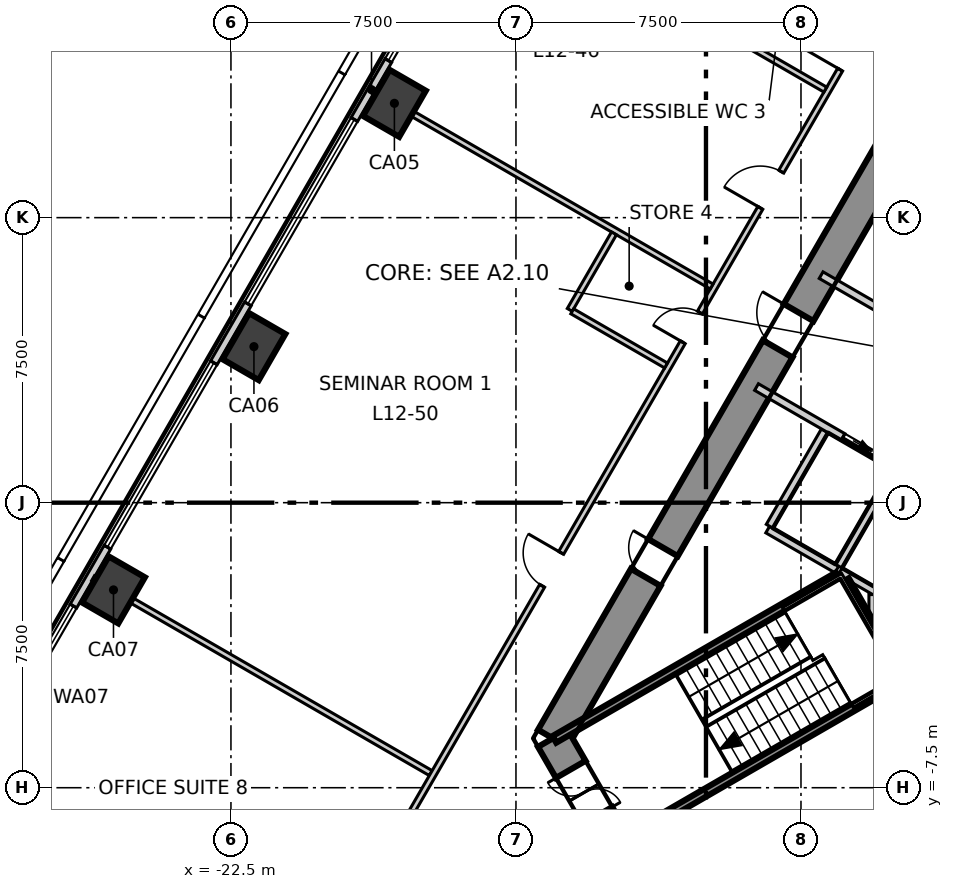
"""IFC4 building model, lengths in metres.
Left out: names, types, materials, properties, quantities, classifications, styles, units other than length and angle.
Written with IfcOpenShell. Run it as: python <this file> out.ifc"""

import sys

from ifc_helpers import new_model, si_unit, direction, frame, frame_2d, origin, origin_2d, place, context, subcontext, project, spatial, polyline, rectangle, outline, extrude, element, fill, save


model = new_model("IFC4")
c1 = context("Model", 3, precision=1e-05, world=origin(), true_north=direction((0.0, 1.0)))
c2 = subcontext(c1, "Body", "Model", "MODEL_VIEW")
j1 = project(units=[si_unit("LENGTHUNIT", "METRE"), si_unit("PLANEANGLEUNIT", "RADIAN")], contexts=[c1])
p1 = place(None, origin())
s1 = spatial("IfcSite", under=j1, at=p1, CompositionType="ELEMENT")
p2 = place(p1, origin())
s2 = spatial("IfcBuilding", under=s1, at=p2, CompositionType="ELEMENT")
p3 = place(p2, frame((0.0, 0.0, 59.3)))
s3 = spatial("IfcBuildingStorey", under=s2, at=p3, CompositionType="ELEMENT", Elevation=59.3)
p4 = place(p3, frame((-1.645, 15.25, -0.3), z_axis=(0.0, 0.0, 1.0), x_axis=(-0.500026485275, -0.866010111964, 0.0)))
e1 = element("IfcWall", 1, at=p4, inside=s3, PredefinedType="SHEAR", context=c2, shape_type="SweptSolid", body=[
    extrude(outline(polyline([(-0.26, -0.45), (1.685, -0.45), (3.63, -0.45), (5.576, -0.45), (7.521, -0.45), (9.466, -0.449), (11.411, -0.449), (13.357, -0.449), (15.302, -0.449), (17.247, -0.449), (19.192, -0.449), (21.138, -0.449), (23.083, -0.449), (25.028, -0.449), (24.509, 0.45), (22.644, 0.45), (20.778, 0.45), (18.913, 0.45), (17.048, 0.45), (15.182, 0.449), (13.317, 0.449), (11.452, 0.449), (9.587, 0.449), (7.721, 0.449), (5.856, 0.449), (3.991, 0.449), (2.125, 0.449), (0.26, 0.449), (-0.26, -0.45)])), origin(), (0.0, 0.0, 1.0), 4.0),
])
p5 = place(p4, frame((11.834, 0.0, 0.3)))
e2 = element("IfcOpeningElement", 2, at=p5, cuts=e1, PredefinedType="OPENING", context=c2, shape_type="SweptSolid", body=[
    extrude(rectangle(XDim=1.1, YDim=2.1, at=frame_2d((0.55, 1.05))), frame((0.0, 0.46, 0.0), z_axis=(0.0, -1.0, 0.0), x_axis=(1.0, 0.0, 0.0)), (0.0, 0.0, 1.0), 0.92),
])
p6 = place(p4, frame((18.976, 0.0, 0.3)))
e3 = element("IfcOpeningElement", 3, at=p6, cuts=e1, PredefinedType="OPENING", context=c2, shape_type="SweptSolid", body=[
    extrude(rectangle(XDim=0.9, YDim=2.1, at=frame_2d((0.45, 1.05))), frame((0.0, 0.46, 0.0), z_axis=(0.0, -1.0, 0.0), x_axis=(1.0, 0.0, 0.0)), (0.0, 0.0, 1.0), 0.92),
])
p7 = place(p4, frame((4.892, 0.0, 0.3)))
e4 = element("IfcOpeningElement", 4, at=p7, cuts=e1, PredefinedType="OPENING", context=c2, shape_type="SweptSolid", body=[
    extrude(rectangle(XDim=0.9, YDim=2.1, at=frame_2d((0.45, 1.05))), frame((0.0, 0.46, 0.0), z_axis=(0.0, -1.0, 0.0), x_axis=(1.0, 0.0, 0.0)), (0.0, 0.0, 1.0), 0.92),
])
p8 = place(p3, frame((-14.03, -6.2, -0.3), z_axis=(0.0, 0.0, 1.0), x_axis=(0.500111984565, -0.865960739811, 0.0)))
e5 = element("IfcWall", 5, at=p8, inside=s3, PredefinedType="SHEAR", context=c2, shape_type="SweptSolid", body=[
    extrude(outline(polyline([(-0.26, -0.449), (1.646, -0.449), (3.551, -0.45), (3.032, 0.45), (1.646, 0.45), (0.26, 0.45), (-0.26, -0.449)])), origin(), (0.0, 0.0, 1.0), 4.0),
])
p9 = place(p8, frame((0.946, 0.0, 0.3)))
e6 = element("IfcOpeningElement", 6, at=p9, cuts=e5, PredefinedType="OPENING", context=c2, shape_type="SweptSolid", body=[
    extrude(rectangle(XDim=1.4, YDim=2.1, at=frame_2d((0.7, 1.05))), frame((0.0, 0.46, 0.0), z_axis=(0.0, -1.0, 0.0), x_axis=(1.0, 0.0, 0.0)), (0.0, 0.0, 1.0), 0.92),
])
for number, where, z_axis, x_axis in (
    (7, (-18.199, 10.508, -0.3), (0.0, 0.0, 1.0), (0.5, 0.866, 0.0)),
    (8, (-21.895, 4.106, -0.3), (0.0, 0.0, 1.0), (0.5, 0.866, 0.0)),
    (9, (-25.591, -2.295, -0.3), (0.0, 0.0, 1.0), (0.5, 0.866, 0.0)),
):
    element("IfcColumn", number, at=place(p3, frame(where, z_axis=z_axis, x_axis=x_axis)), inside=s3, PredefinedType="COLUMN", context=c2, shape_type="SweptSolid", body=[
        extrude(rectangle(XDim=1.4, YDim=1.1, at=origin_2d()), origin(), (0.0, 0.0, 1.0), 4.0),
    ])
p10 = place(p3, frame((-3.371, 37.591, 0.0), z_axis=(0.0, 0.0, 1.0), x_axis=(-0.500006313899, -0.866021758423, 0.0)))
e10 = element("IfcWall", 10, at=p10, inside=s3, PredefinedType="ELEMENTEDWALL", context=c2, shape_type="SweptSolid", body=[
    extrude(rectangle(XDim=61.719, YDim=0.2, at=frame_2d((30.859, 0.0))), origin(), (0.0, 0.0, 1.0), 3.7),
])
p11 = place(p10, frame((2.198, 0.0, 0.9)))
e11 = element("IfcOpeningElement", 11, at=p11, cuts=e10, PredefinedType="OPENING", context=c2, shape_type="SweptSolid", body=[
    extrude(rectangle(XDim=5.6, YDim=2.5, at=frame_2d((2.8, 1.25))), frame((0.0, 0.11, 0.0), z_axis=(0.0, -1.0, 0.0), x_axis=(1.0, 0.0, 0.0)), (0.0, 0.0, 1.0), 0.22),
])
p12 = place(p10, frame((9.59, 0.0, 0.9)))
e12 = element("IfcOpeningElement", 12, at=p12, cuts=e10, PredefinedType="OPENING", context=c2, shape_type="SweptSolid", body=[
    extrude(rectangle(XDim=5.6, YDim=2.5, at=frame_2d((2.8, 1.25))), frame((0.0, 0.11, 0.0), z_axis=(0.0, -1.0, 0.0), x_axis=(1.0, 0.0, 0.0)), (0.0, 0.0, 1.0), 0.22),
])
p13 = place(p10, frame((16.982, 0.0, 0.9)))
e13 = element("IfcOpeningElement", 13, at=p13, cuts=e10, PredefinedType="OPENING", context=c2, shape_type="SweptSolid", body=[
    extrude(rectangle(XDim=5.6, YDim=2.5, at=frame_2d((2.8, 1.25))), frame((0.0, 0.11, 0.0), z_axis=(0.0, -1.0, 0.0), x_axis=(1.0, 0.0, 0.0)), (0.0, 0.0, 1.0), 0.22),
])
p14 = place(p10, frame((24.373, 0.0, 0.9)))
e14 = element("IfcOpeningElement", 14, at=p14, cuts=e10, PredefinedType="OPENING", context=c2, shape_type="SweptSolid", body=[
    extrude(rectangle(XDim=5.6, YDim=2.5, at=frame_2d((2.8, 1.25))), frame((0.0, 0.11, 0.0), z_axis=(0.0, -1.0, 0.0), x_axis=(1.0, 0.0, 0.0)), (0.0, 0.0, 1.0), 0.22),
])
p15 = place(p10, frame((31.765, 0.0, 0.9)))
e15 = element("IfcOpeningElement", 15, at=p15, cuts=e10, PredefinedType="OPENING", context=c2, shape_type="SweptSolid", body=[
    extrude(rectangle(XDim=5.6, YDim=2.5, at=frame_2d((2.8, 1.25))), frame((0.0, 0.11, 0.0), z_axis=(0.0, -1.0, 0.0), x_axis=(1.0, 0.0, 0.0)), (0.0, 0.0, 1.0), 0.22),
])
p16 = place(p10, frame((39.157, 0.0, 0.9)))
e16 = element("IfcOpeningElement", 16, at=p16, cuts=e10, PredefinedType="OPENING", context=c2, shape_type="SweptSolid", body=[
    extrude(rectangle(XDim=5.6, YDim=2.5, at=frame_2d((2.8, 1.25))), frame((0.0, 0.11, 0.0), z_axis=(0.0, -1.0, 0.0), x_axis=(1.0, 0.0, 0.0)), (0.0, 0.0, 1.0), 0.22),
])
p17 = place(p10, frame((46.548, 0.0, 0.9)))
e17 = element("IfcOpeningElement", 17, at=p17, cuts=e10, PredefinedType="OPENING", context=c2, shape_type="SweptSolid", body=[
    extrude(rectangle(XDim=5.6, YDim=2.5, at=frame_2d((2.8, 1.25))), frame((0.0, 0.11, 0.0), z_axis=(0.0, -1.0, 0.0), x_axis=(1.0, 0.0, 0.0)), (0.0, 0.0, 1.0), 0.22),
])
p18 = place(p10, frame((53.94, 0.0, 0.9)))
e18 = element("IfcOpeningElement", 18, at=p18, cuts=e10, PredefinedType="OPENING", context=c2, shape_type="SweptSolid", body=[
    extrude(rectangle(XDim=5.6, YDim=2.5, at=frame_2d((2.8, 1.25))), frame((0.0, 0.11, 0.0), z_axis=(0.0, -1.0, 0.0), x_axis=(1.0, 0.0, 0.0)), (0.0, 0.0, 1.0), 0.22),
])
p19 = place(p3, frame((-26.128, -1.985, 0.0), z_axis=(0.0, 0.0, 1.0), x_axis=(0.866020337685, -0.500008774639, 0.0)))
e19 = element("IfcWall", 19, at=p19, inside=s3, PredefinedType="PARTITIONING", context=c2, shape_type="SweptSolid", body=[
    extrude(rectangle(XDim=10.26, YDim=0.15, at=frame_2d((5.13, 0.0))), origin(), (0.0, 0.0, 1.0), 3.7),
])
p20 = place(p3, frame((-19.497, -11.17, 0.0), z_axis=(0.0, 0.0, 1.0), x_axis=(0.499998854553, 0.866026065108, 0.0)))
e20 = element("IfcWall", 20, at=p20, inside=s3, PredefinedType="PARTITIONING", context=c2, shape_type="SweptSolid", body=[
    extrude(rectangle(XDim=38.994, YDim=0.15, at=frame_2d((19.497, 0.0))), origin(), (0.0, 0.0, 1.0), 3.7),
])
p21 = place(p20, frame((36.044, 0.0, 0.0)))
e21 = element("IfcOpeningElement", 21, at=p21, cuts=e20, PredefinedType="OPENING", context=c2, shape_type="SweptSolid", body=[
    extrude(rectangle(XDim=1.1, YDim=2.1, at=frame_2d((0.55, 1.05))), frame((0.0, 0.085, 0.0), z_axis=(0.0, -1.0, 0.0), x_axis=(1.0, 0.0, 0.0)), (0.0, 0.0, 1.0), 0.17),
])
p22 = place(p20, frame((21.855, 0.0, 0.0)))
e22 = element("IfcOpeningElement", 22, at=p22, cuts=e20, PredefinedType="OPENING", context=c2, shape_type="SweptSolid", body=[
    extrude(rectangle(XDim=1.1, YDim=2.1, at=frame_2d((0.55, 1.05))), frame((0.0, 0.085, 0.0), z_axis=(0.0, -1.0, 0.0), x_axis=(1.0, 0.0, 0.0)), (0.0, 0.0, 1.0), 0.17),
])
p23 = place(p20, frame((32.155, 0.0, 0.0)))
e23 = element("IfcOpeningElement", 23, at=p23, cuts=e20, PredefinedType="OPENING", context=c2, shape_type="SweptSolid", body=[
    extrude(rectangle(XDim=0.9, YDim=2.1, at=frame_2d((0.45, 1.05))), frame((0.0, 0.085, 0.0), z_axis=(0.0, -1.0, 0.0), x_axis=(1.0, 0.0, 0.0)), (0.0, 0.0, 1.0), 0.17),
])
p24 = place(p20, frame((28.955, 0.0, 0.0)))
e24 = element("IfcOpeningElement", 24, at=p24, cuts=e20, PredefinedType="OPENING", context=c2, shape_type="SweptSolid", body=[
    extrude(rectangle(XDim=0.9, YDim=2.1, at=frame_2d((0.45, 1.05))), frame((0.0, 0.085, 0.0), z_axis=(0.0, -1.0, 0.0), x_axis=(1.0, 0.0, 0.0)), (0.0, 0.0, 1.0), 0.17),
])
p25 = place(p20, frame((26.055, 0.0, 0.0)))
e25 = element("IfcOpeningElement", 25, at=p25, cuts=e20, PredefinedType="OPENING", context=c2, shape_type="SweptSolid", body=[
    extrude(rectangle(XDim=1.0, YDim=2.1, at=frame_2d((0.5, 1.05))), frame((0.0, 0.085, 0.0), z_axis=(0.0, -1.0, 0.0), x_axis=(1.0, 0.0, 0.0)), (0.0, 0.0, 1.0), 0.17),
])
p26 = place(p20, frame((10.373, 0.0, 0.0)))
e26 = element("IfcOpeningElement", 26, at=p26, cuts=e20, PredefinedType="OPENING", context=c2, shape_type="SweptSolid", body=[
    extrude(rectangle(XDim=1.0, YDim=2.1, at=frame_2d((0.5, 1.05))), frame((0.0, 0.085, 0.0), z_axis=(0.0, -1.0, 0.0), x_axis=(1.0, 0.0, 0.0)), (0.0, 0.0, 1.0), 0.17),
])
p27 = place(p20, frame((17.773, 0.0, 0.0)))
e27 = element("IfcOpeningElement", 27, at=p27, cuts=e20, PredefinedType="OPENING", context=c2, shape_type="SweptSolid", body=[
    extrude(rectangle(XDim=0.9, YDim=2.1, at=frame_2d((0.45, 1.05))), frame((0.0, 0.085, 0.0), z_axis=(0.0, -1.0, 0.0), x_axis=(1.0, 0.0, 0.0)), (0.0, 0.0, 1.0), 0.17),
])
p28 = place(p20, frame((1.689, 0.0, 0.0)))
e28 = element("IfcOpeningElement", 28, at=p28, cuts=e20, PredefinedType="OPENING", context=c2, shape_type="SweptSolid", body=[
    extrude(rectangle(XDim=1.1, YDim=2.1, at=frame_2d((0.55, 1.05))), frame((0.0, 0.085, 0.0), z_axis=(0.0, -1.0, 0.0), x_axis=(1.0, 0.0, 0.0)), (0.0, 0.0, 1.0), 0.17),
])
p29 = place(p3, frame((-18.736, 10.818, 0.0), z_axis=(0.0, 0.0, 1.0), x_axis=(0.866010033384, -0.500026621369, 0.0)))
e29 = element("IfcWall", 29, at=p29, inside=s3, PredefinedType="PARTITIONING", context=c2, shape_type="SweptSolid", body=[
    extrude(rectangle(XDim=10.26, YDim=0.15, at=frame_2d((5.13, 0.0))), origin(), (0.0, 0.0, 1.0), 3.2),
])
p30 = place(p3, frame((-13.584, 5.072, 0.0), z_axis=(0.0, 0.0, 1.0), x_axis=(0.500113184874, 0.865960046605, 0.0)))
e30 = element("IfcWall", 30, at=p30, inside=s3, PredefinedType="PARTITIONING", context=c2, shape_type="SweptSolid", body=[
    extrude(rectangle(XDim=2.326, YDim=0.15, at=frame_2d((1.163, 0.0))), origin(), (0.0, 0.0, 1.0), 3.7),
])
p31 = place(p3, frame((-13.519, 5.035, 0.0), z_axis=(0.0, 0.0, 1.0), x_axis=(0.866041498374, -0.499972122318, 0.0)))
e31 = element("IfcWall", 31, at=p31, inside=s3, PredefinedType="PARTITIONING", context=c2, shape_type="SweptSolid", body=[
    extrude(rectangle(XDim=2.85, YDim=0.15, at=frame_2d((1.425, 0.0))), origin(), (0.0, 0.0, 1.0), 3.7),
])
p32 = place(p3, frame((-9.847, 12.594, 0.0), z_axis=(0.0, 0.0, 1.0), x_axis=(0.865942736565, -0.500143156496, 0.0)))
e32 = element("IfcWall", 32, at=p32, inside=s3, PredefinedType="PARTITIONING", context=c2, shape_type="SweptSolid", body=[
    extrude(rectangle(XDim=3.449, YDim=0.15, at=frame_2d((1.725, 0.0))), origin(), (0.0, 0.0, 1.0), 3.7),
])
p33 = place(p3, frame((-8.376, -0.707, 0.0), z_axis=(0.0, 0.0, 1.0), x_axis=(0.866067520717, -0.499927044236, 0.0)))
e33 = element("IfcWall", 33, at=p33, inside=s3, PredefinedType="SOLIDWALL", context=c2, shape_type="SweptSolid", body=[
    extrude(rectangle(XDim=2.1, YDim=0.2, at=frame_2d((1.05, 0.0))), origin(), (0.0, 0.0, 1.0), 3.7),
])
p34 = place(p3, frame((-8.326, -0.62, 0.0), z_axis=(0.0, 0.0, 1.0), x_axis=(0.500023687443, 0.866011727401, 0.0)))
e34 = element("IfcWall", 34, at=p34, inside=s3, PredefinedType="SOLIDWALL", context=c2, shape_type="SweptSolid", body=[
    extrude(rectangle(XDim=2.9, YDim=0.2, at=frame_2d((1.45, 0.0))), origin(), (0.0, 0.0, 1.0), 3.7),
])
p35 = place(p3, frame((-8.67, 3.043, 0.0), z_axis=(0.0, 0.0, 1.0), x_axis=(0.866029956157, -0.499992114976, 0.0)))
e35 = element("IfcWall", 35, at=p35, inside=s3, PredefinedType="SOLIDWALL", context=c2, shape_type="SweptSolid", body=[
    extrude(rectangle(XDim=4.232, YDim=0.2, at=frame_2d((2.116, 0.0))), origin(), (0.0, 0.0, 1.0), 3.7),
])
p36 = place(p35, frame((2.63, 0.0, 0.0)))
e36 = element("IfcOpeningElement", 36, at=p36, cuts=e35, PredefinedType="OPENING", context=c2, shape_type="SweptSolid", body=[
    extrude(rectangle(XDim=1.1, YDim=2.1, at=frame_2d((0.55, 1.05))), frame((0.0, 0.11, 0.0), z_axis=(0.0, -1.0, 0.0), x_axis=(1.0, 0.0, 0.0)), (0.0, 0.0, 1.0), 0.22),
])
p37 = place(p3, frame((-6.97, 5.987, 0.0), z_axis=(0.0, 0.0, 1.0), x_axis=(0.866029956157, -0.499992114976, 0.0)))
e37 = element("IfcWall", 37, at=p37, inside=s3, PredefinedType="SOLIDWALL", context=c2, shape_type="SweptSolid", body=[
    extrude(rectangle(XDim=4.232, YDim=0.2, at=frame_2d((2.116, 0.0))), origin(), (0.0, 0.0, 1.0), 3.7),
])
p38 = place(p37, frame((2.73, 0.0, 0.0)))
e38 = element("IfcOpeningElement", 38, at=p38, cuts=e37, PredefinedType="OPENING", context=c2, shape_type="SweptSolid", body=[
    extrude(rectangle(XDim=0.9, YDim=2.1, at=frame_2d((0.45, 1.05))), frame((0.0, 0.11, 0.0), z_axis=(0.0, -1.0, 0.0), x_axis=(1.0, 0.0, 0.0)), (0.0, 0.0, 1.0), 0.22),
])
p39 = place(p3, frame((-6.507, -1.67, 0.0), z_axis=(0.0, 0.0, 1.0), x_axis=(0.50012328804, 0.865954211699, 0.0)))
e39 = element("IfcWall", 39, at=p39, inside=s3, PredefinedType="SOLIDWALL", context=c2, shape_type="SweptSolid", body=[
    extrude(rectangle(XDim=2.9, YDim=0.2, at=frame_2d((1.45, 0.0))), origin(), (0.0, 0.0, 1.0), 3.7),
])
p40 = place(p3, frame((-6.47, -1.807, 0.0), z_axis=(0.0, 0.0, 1.0), x_axis=(0.865883195159, -0.500246231712, 0.0)))
e40 = element("IfcWall", 40, at=p40, inside=s3, PredefinedType="SOLIDWALL", context=c2, shape_type="SweptSolid", body=[
    extrude(rectangle(XDim=1.815, YDim=0.2, at=frame_2d((0.908, 0.0))), origin(), (0.0, 0.0, 1.0), 3.7),
])
p41 = place(p3, frame((-5.612, -3.08, 0.0), z_axis=(0.0, 0.0, 1.0), x_axis=(0.0, 1.0, 0.0)))
e41 = element("IfcWall", 41, at=p41, inside=s3, PredefinedType="SOLIDWALL", context=c2, shape_type="SweptSolid", body=[
    extrude(rectangle(XDim=0.662, YDim=0.2, at=frame_2d((0.331, 0.0))), origin(), (0.0, 0.0, 1.0), 3.7),
])
p42 = place(p3, frame((-13.99, -6.229, 0.0), z_axis=(0.0, 0.0, 1.0), x_axis=(0.866060059011, 0.499939970583, 0.0)))
e42 = element("IfcWall", 42, at=p42, inside=s3, PredefinedType="SOLIDWALL", context=c2, shape_type="SweptSolid", body=[
    extrude(rectangle(XDim=8.615, YDim=0.2, at=frame_2d((4.307, 0.0))), origin(), (0.0, 0.0, 1.0), 3.7),
])
p43 = place(p3, frame((-6.329, -2.038, 0.0), z_axis=(0.0, 0.0, 1.0), x_axis=(0.500200581029, -0.865909567298, 0.0)))
e43 = element("IfcWall", 43, at=p43, inside=s3, PredefinedType="SOLIDWALL", context=c2, shape_type="SweptSolid", body=[
    extrude(rectangle(XDim=2.799, YDim=0.2, at=frame_2d((1.399, 0.0))), origin(), (0.0, 0.0, 1.0), 3.7),
])
p44 = place(p3, frame((-12.39, -9.001, 0.0), z_axis=(0.0, 0.0, 1.0), x_axis=(0.866010975815, 0.500024989144, 0.0)))
e44 = element("IfcWall", 44, at=p44, inside=s3, PredefinedType="SOLIDWALL", context=c2, shape_type="SweptSolid", body=[
    extrude(rectangle(XDim=8.615, YDim=0.2, at=frame_2d((4.308, 0.0))), origin(), (0.0, 0.0, 1.0), 3.7),
])
p45 = place(p14, origin())
e45 = element("IfcWindow", 45, at=p45, inside=s3, PartitioningType="SINGLE_PANEL", PredefinedType="WINDOW", context=c2, shape_type="SweptSolid", body=[
    extrude(rectangle(XDim=5.6, YDim=2.5, at=frame_2d((2.8, 1.25))), frame((0.0, 0.03, 0.0), z_axis=(0.0, -1.0, 0.0), x_axis=(1.0, 0.0, 0.0)), (0.0, 0.0, 1.0), 0.06),
])
fill(e14, e45)
p46 = place(p15, origin())
e46 = element("IfcWindow", 46, at=p46, inside=s3, PartitioningType="SINGLE_PANEL", PredefinedType="WINDOW", context=c2, shape_type="SweptSolid", body=[
    extrude(rectangle(XDim=5.6, YDim=2.5, at=frame_2d((2.8, 1.25))), frame((0.0, 0.03, 0.0), z_axis=(0.0, -1.0, 0.0), x_axis=(1.0, 0.0, 0.0)), (0.0, 0.0, 1.0), 0.06),
])
fill(e15, e46)
p47 = place(p16, origin())
e47 = element("IfcWindow", 47, at=p47, inside=s3, PartitioningType="SINGLE_PANEL", PredefinedType="WINDOW", context=c2, shape_type="SweptSolid", body=[
    extrude(rectangle(XDim=5.6, YDim=2.5, at=frame_2d((2.8, 1.25))), frame((0.0, 0.03, 0.0), z_axis=(0.0, -1.0, 0.0), x_axis=(1.0, 0.0, 0.0)), (0.0, 0.0, 1.0), 0.06),
])
fill(e16, e47)
p48 = place(p17, origin())
e48 = element("IfcWindow", 48, at=p48, inside=s3, PartitioningType="SINGLE_PANEL", PredefinedType="WINDOW", context=c2, shape_type="SweptSolid", body=[
    extrude(rectangle(XDim=5.6, YDim=2.5, at=frame_2d((2.8, 1.25))), frame((0.0, 0.03, 0.0), z_axis=(0.0, -1.0, 0.0), x_axis=(1.0, 0.0, 0.0)), (0.0, 0.0, 1.0), 0.06),
])
fill(e17, e48)
p49 = place(p36, origin())
e49 = element("IfcDoor", 49, at=p49, inside=s3, OperationType="SLIDING_TO_LEFT", PredefinedType="DOOR", context=c2, shape_type="SweptSolid", body=[
    extrude(rectangle(XDim=1.1, YDim=2.1, at=frame_2d((0.55, 1.05))), frame((0.0, 0.025, 0.0), z_axis=(0.0, -1.0, 0.0), x_axis=(1.0, 0.0, 0.0)), (0.0, 0.0, 1.0), 0.05),
])
fill(e36, e49)
p50 = place(p22, origin())
e50 = element("IfcDoor", 50, at=p50, inside=s3, OperationType="SINGLE_SWING_RIGHT", PredefinedType="DOOR", context=c2, shape_type="SweptSolid", body=[
    extrude(rectangle(XDim=1.1, YDim=2.1, at=frame_2d((0.55, 1.05))), frame((0.0, 0.025, 0.0), z_axis=(0.0, -1.0, 0.0), x_axis=(1.0, 0.0, 0.0)), (0.0, 0.0, 1.0), 0.05),
])
fill(e22, e50)
p51 = place(p25, origin())
e51 = element("IfcDoor", 51, at=p51, inside=s3, OperationType="SINGLE_SWING_RIGHT", PredefinedType="DOOR", context=c2, shape_type="SweptSolid", body=[
    extrude(rectangle(XDim=1.0, YDim=2.1, at=frame_2d((0.5, 1.05))), frame((0.0, 0.025, 0.0), z_axis=(0.0, -1.0, 0.0), x_axis=(1.0, 0.0, 0.0)), (0.0, 0.0, 1.0), 0.05),
])
fill(e25, e51)
p52 = place(p26, origin())
e52 = element("IfcDoor", 52, at=p52, inside=s3, OperationType="SINGLE_SWING_LEFT", PredefinedType="DOOR", context=c2, shape_type="SweptSolid", body=[
    extrude(rectangle(XDim=1.0, YDim=2.1, at=frame_2d((0.5, 1.05))), frame((0.0, 0.025, 0.0), z_axis=(0.0, -1.0, 0.0), x_axis=(1.0, 0.0, 0.0)), (0.0, 0.0, 1.0), 0.05),
])
fill(e26, e52)
p53 = place(p27, origin())
e53 = element("IfcDoor", 53, at=p53, inside=s3, OperationType="SINGLE_SWING_RIGHT", PredefinedType="DOOR", context=c2, shape_type="SweptSolid", body=[
    extrude(rectangle(XDim=0.9, YDim=2.1, at=frame_2d((0.45, 1.05))), frame((0.0, 0.025, 0.0), z_axis=(0.0, -1.0, 0.0), x_axis=(1.0, 0.0, 0.0)), (0.0, 0.0, 1.0), 0.05),
])
fill(e27, e53)
p54 = place(p9, origin())
e54 = element("IfcDoor", 54, at=p54, inside=s3, OperationType="DOUBLE_DOOR_SINGLE_SWING", PredefinedType="DOOR", context=c2, shape_type="SweptSolid", body=[
    extrude(rectangle(XDim=1.4, YDim=2.1, at=frame_2d((0.7, 1.05))), frame((0.0, 0.025, 0.0), z_axis=(0.0, -1.0, 0.0), x_axis=(1.0, 0.0, 0.0)), (0.0, 0.0, 1.0), 0.05),
])
fill(e6, e54)
p55 = place(p5, origin())
e55 = element("IfcDoor", 55, at=p55, inside=s3, OperationType="SINGLE_SWING_LEFT", PredefinedType="DOOR", context=c2, shape_type="SweptSolid", body=[
    extrude(rectangle(XDim=1.1, YDim=2.1, at=frame_2d((0.55, 1.05))), frame((0.0, 0.025, 0.0), z_axis=(0.0, -1.0, 0.0), x_axis=(1.0, 0.0, 0.0)), (0.0, 0.0, 1.0), 0.05),
])
fill(e2, e55)
p56 = place(p6, origin())
e56 = element("IfcDoor", 56, at=p56, inside=s3, OperationType="SINGLE_SWING_LEFT", PredefinedType="DOOR", context=c2, shape_type="SweptSolid", body=[
    extrude(rectangle(XDim=0.9, YDim=2.1, at=frame_2d((0.45, 1.05))), frame((0.0, 0.025, 0.0), z_axis=(0.0, -1.0, 0.0), x_axis=(1.0, 0.0, 0.0)), (0.0, 0.0, 1.0), 0.05),
])
fill(e3, e56)
save(model, sys.argv[1])
